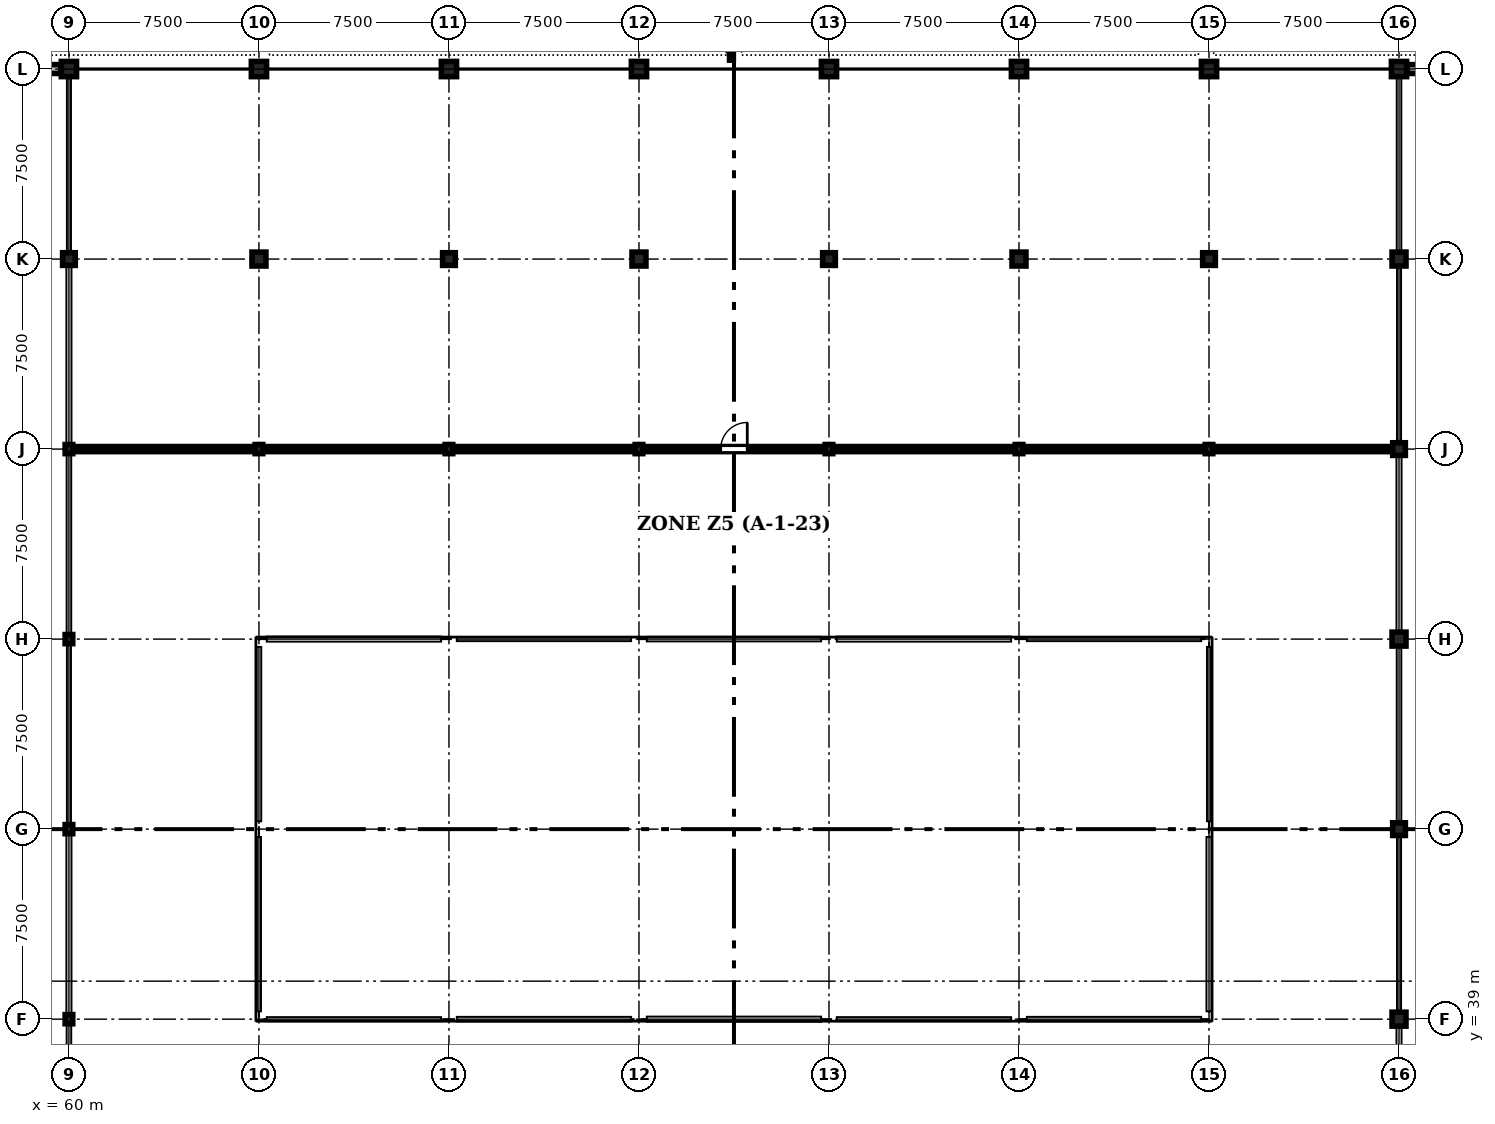
"""IFC4 building model, lengths in metres.
Left out: names, types, materials, properties, quantities, classifications, styles, units other than length and angle.
Written with IfcOpenShell. Run it as: python <this file> out.ifc"""

import sys

from ifc_helpers import new_model, si_unit, direction, frame, frame_2d, origin, origin_2d, place, context, subcontext, project, spatial, rectangle, circle, i_section, extrude, element, fill, save


model = new_model("IFC4")
c1 = context("Model", 3, precision=1e-05, world=origin(), true_north=direction((0.0, 1.0)))
c2 = subcontext(c1, "Body", "Model", "MODEL_VIEW")
j1 = project(units=[si_unit("LENGTHUNIT", "METRE"), si_unit("PLANEANGLEUNIT", "RADIAN")], contexts=[c1])
p1 = place(None, origin())
s1 = spatial("IfcSite", under=j1, at=p1, CompositionType="ELEMENT")
p2 = place(p1, origin())
s2 = spatial("IfcBuilding", under=s1, at=p2, CompositionType="ELEMENT")
p3 = place(p2, frame((0.0, 0.0, 4.8)))
s3 = spatial("IfcBuildingStorey", under=s2, at=p3, CompositionType="ELEMENT", Elevation=4.8)
for number, where, z_axis, x_axis in (
    (1, (60.0, 39.0, 0.0), (0.0, 0.0, 1.0), (1.0, 0.0, 0.0)),
    (2, (60.0, 46.5, 0.0), (0.0, 0.0, 1.0), (1.0, 0.0, 0.0)),
    (3, (60.0, 54.0, 0.0), (0.0, 0.0, 1.0), (1.0, 0.0, 0.0)),
    (4, (60.0, 61.5, 0.0), (0.0, 0.0, 1.0), (1.0, 0.0, 0.0)),
):
    element("IfcColumn", number, at=place(p3, frame(where, z_axis=z_axis, x_axis=x_axis)), inside=s3, PredefinedType="COLUMN", context=c2, shape_type="SweptSolid", body=[
        extrude(i_section(OverallWidth=0.3, OverallDepth=0.36, WebThickness=0.012, FlangeThickness=0.022, FilletRadius=0.027, at=origin_2d()), origin(), (0.0, 0.0, 1.0), 4.5),
    ])
p4 = place(p3, frame((60.0, 69.0, 0.0), z_axis=(0.0, 0.0, 1.0), x_axis=(1.0, 0.0, 0.0)))
e5 = element("IfcColumn", 5, at=p4, inside=s3, PredefinedType="COLUMN", context=c2, shape_type="SweptSolid", body=[
    extrude(rectangle(XDim=0.5, YDim=0.5, at=origin_2d()), origin(), (0.0, 0.0, 1.0), 4.5),
])
p5 = place(p3, frame((60.0, 76.5, 0.0), z_axis=(0.0, 0.0, 1.0), x_axis=(1.0, 0.0, 0.0)))
e6 = element("IfcColumn", 6, at=p5, inside=s3, PredefinedType="COLUMN", context=c2, shape_type="SweptSolid", body=[
    extrude(circle(Radius=0.3, at=origin_2d()), origin(), (0.0, 0.0, 1.0), 4.5),
])
p6 = place(p3, frame((67.5, 61.5, 0.0), z_axis=(0.0, 0.0, 1.0), x_axis=(1.0, 0.0, 0.0)))
e7 = element("IfcColumn", 7, at=p6, inside=s3, PredefinedType="COLUMN", context=c2, shape_type="SweptSolid", body=[
    extrude(i_section(OverallWidth=0.3, OverallDepth=0.36, WebThickness=0.012, FlangeThickness=0.022, FilletRadius=0.027, at=origin_2d()), origin(), (0.0, 0.0, 1.0), 4.5),
])
p7 = place(p3, frame((67.5, 69.0, 0.0), z_axis=(0.0, 0.0, 1.0), x_axis=(1.0, 0.0, 0.0)))
e8 = element("IfcColumn", 8, at=p7, inside=s3, PredefinedType="COLUMN", context=c2, shape_type="SweptSolid", body=[
    extrude(rectangle(XDim=0.55, YDim=0.55, at=origin_2d()), origin(), (0.0, 0.0, 1.0), 4.5),
])
p8 = place(p3, frame((67.5, 76.5, 0.0), z_axis=(0.0, 0.0, 1.0), x_axis=(1.0, 0.0, 0.0)))
e9 = element("IfcColumn", 9, at=p8, inside=s3, PredefinedType="COLUMN", context=c2, shape_type="SweptSolid", body=[
    extrude(rectangle(XDim=0.6, YDim=0.6, at=origin_2d()), origin(), (0.0, 0.0, 1.0), 4.5),
])
p9 = place(p3, frame((75.0, 61.5, 0.0), z_axis=(0.0, 0.0, 1.0), x_axis=(1.0, 0.0, 0.0)))
e10 = element("IfcColumn", 10, at=p9, inside=s3, PredefinedType="COLUMN", context=c2, shape_type="SweptSolid", body=[
    extrude(i_section(OverallWidth=0.3, OverallDepth=0.36, WebThickness=0.012, FlangeThickness=0.022, FilletRadius=0.027, at=origin_2d()), origin(), (0.0, 0.0, 1.0), 4.5),
])
p10 = place(p3, frame((75.0, 69.0, 0.0), z_axis=(0.0, 0.0, 1.0), x_axis=(1.0, 0.0, 0.0)))
e11 = element("IfcColumn", 11, at=p10, inside=s3, PredefinedType="COLUMN", context=c2, shape_type="SweptSolid", body=[
    extrude(rectangle(XDim=0.5, YDim=0.5, at=origin_2d()), origin(), (0.0, 0.0, 1.0), 4.5),
])
p11 = place(p3, frame((75.0, 76.5, 0.0), z_axis=(0.0, 0.0, 1.0), x_axis=(1.0, 0.0, 0.0)))
e12 = element("IfcColumn", 12, at=p11, inside=s3, PredefinedType="COLUMN", context=c2, shape_type="SweptSolid", body=[
    extrude(rectangle(XDim=0.6, YDim=0.6, at=origin_2d()), origin(), (0.0, 0.0, 1.0), 4.5),
])
p12 = place(p3, frame((82.5, 61.5, 0.0), z_axis=(0.0, 0.0, 1.0), x_axis=(1.0, 0.0, 0.0)))
e13 = element("IfcColumn", 13, at=p12, inside=s3, PredefinedType="COLUMN", context=c2, shape_type="SweptSolid", body=[
    extrude(i_section(OverallWidth=0.3, OverallDepth=0.36, WebThickness=0.012, FlangeThickness=0.022, FilletRadius=0.027, at=origin_2d()), origin(), (0.0, 0.0, 1.0), 4.5),
])
p13 = place(p3, frame((82.5, 69.0, 0.0), z_axis=(0.0, 0.0, 1.0), x_axis=(1.0, 0.0, 0.0)))
e14 = element("IfcColumn", 14, at=p13, inside=s3, PredefinedType="COLUMN", context=c2, shape_type="SweptSolid", body=[
    extrude(rectangle(XDim=0.55, YDim=0.55, at=origin_2d()), origin(), (0.0, 0.0, 1.0), 4.5),
])
p14 = place(p3, frame((82.5, 76.5, 0.0), z_axis=(0.0, 0.0, 1.0), x_axis=(1.0, 0.0, 0.0)))
e15 = element("IfcColumn", 15, at=p14, inside=s3, PredefinedType="COLUMN", context=c2, shape_type="SweptSolid", body=[
    extrude(circle(Radius=0.3, at=origin_2d()), origin(), (0.0, 0.0, 1.0), 4.5),
])
p15 = place(p3, frame((90.0, 61.5, 0.0), z_axis=(0.0, 0.0, 1.0), x_axis=(1.0, 0.0, 0.0)))
e16 = element("IfcColumn", 16, at=p15, inside=s3, PredefinedType="COLUMN", context=c2, shape_type="SweptSolid", body=[
    extrude(i_section(OverallWidth=0.3, OverallDepth=0.36, WebThickness=0.012, FlangeThickness=0.022, FilletRadius=0.027, at=origin_2d()), origin(), (0.0, 0.0, 1.0), 4.5),
])
p16 = place(p3, frame((90.0, 69.0, 0.0), z_axis=(0.0, 0.0, 1.0), x_axis=(1.0, 0.0, 0.0)))
e17 = element("IfcColumn", 17, at=p16, inside=s3, PredefinedType="COLUMN", context=c2, shape_type="SweptSolid", body=[
    extrude(rectangle(XDim=0.5, YDim=0.5, at=origin_2d()), origin(), (0.0, 0.0, 1.0), 4.5),
])
p17 = place(p3, frame((90.0, 76.5, 0.0), z_axis=(0.0, 0.0, 1.0), x_axis=(1.0, 0.0, 0.0)))
e18 = element("IfcColumn", 18, at=p17, inside=s3, PredefinedType="COLUMN", context=c2, shape_type="SweptSolid", body=[
    extrude(rectangle(XDim=0.6, YDim=0.6, at=origin_2d()), origin(), (0.0, 0.0, 1.0), 4.5),
])
p18 = place(p3, frame((97.5, 61.5, 0.0), z_axis=(0.0, 0.0, 1.0), x_axis=(1.0, 0.0, 0.0)))
e19 = element("IfcColumn", 19, at=p18, inside=s3, PredefinedType="COLUMN", context=c2, shape_type="SweptSolid", body=[
    extrude(i_section(OverallWidth=0.3, OverallDepth=0.36, WebThickness=0.012, FlangeThickness=0.022, FilletRadius=0.027, at=origin_2d()), origin(), (0.0, 0.0, 1.0), 4.5),
])
p19 = place(p3, frame((97.5, 69.0, 0.0), z_axis=(0.0, 0.0, 1.0), x_axis=(1.0, 0.0, 0.0)))
e20 = element("IfcColumn", 20, at=p19, inside=s3, PredefinedType="COLUMN", context=c2, shape_type="SweptSolid", body=[
    extrude(rectangle(XDim=0.55, YDim=0.55, at=origin_2d()), origin(), (0.0, 0.0, 1.0), 4.5),
])
p20 = place(p3, frame((97.5, 76.5, 0.0), z_axis=(0.0, 0.0, 1.0), x_axis=(1.0, 0.0, 0.0)))
e21 = element("IfcColumn", 21, at=p20, inside=s3, PredefinedType="COLUMN", context=c2, shape_type="SweptSolid", body=[
    extrude(rectangle(XDim=0.6, YDim=0.6, at=origin_2d()), origin(), (0.0, 0.0, 1.0), 4.5),
])
p21 = place(p3, frame((105.0, 61.5, 0.0), z_axis=(0.0, 0.0, 1.0), x_axis=(1.0, 0.0, 0.0)))
e22 = element("IfcColumn", 22, at=p21, inside=s3, PredefinedType="COLUMN", context=c2, shape_type="SweptSolid", body=[
    extrude(i_section(OverallWidth=0.3, OverallDepth=0.36, WebThickness=0.012, FlangeThickness=0.022, FilletRadius=0.027, at=origin_2d()), origin(), (0.0, 0.0, 1.0), 4.5),
])
p22 = place(p3, frame((105.0, 69.0, 0.0), z_axis=(0.0, 0.0, 1.0), x_axis=(1.0, 0.0, 0.0)))
e23 = element("IfcColumn", 23, at=p22, inside=s3, PredefinedType="COLUMN", context=c2, shape_type="SweptSolid", body=[
    extrude(rectangle(XDim=0.5, YDim=0.5, at=origin_2d()), origin(), (0.0, 0.0, 1.0), 4.5),
])
p23 = place(p3, frame((105.0, 76.5, 0.0), z_axis=(0.0, 0.0, 1.0), x_axis=(1.0, 0.0, 0.0)))
e24 = element("IfcColumn", 24, at=p23, inside=s3, PredefinedType="COLUMN", context=c2, shape_type="SweptSolid", body=[
    extrude(circle(Radius=0.3, at=origin_2d()), origin(), (0.0, 0.0, 1.0), 4.5),
])
p24 = place(p3, frame((112.5, 39.0, 0.0), z_axis=(0.0, 0.0, 1.0), x_axis=(1.0, 0.0, 0.0)))
e25 = element("IfcColumn", 25, at=p24, inside=s3, PredefinedType="COLUMN", context=c2, shape_type="SweptSolid", body=[
    extrude(rectangle(XDim=0.55, YDim=0.55, at=origin_2d()), origin(), (0.0, 0.0, 1.0), 4.5),
])
p25 = place(p3, frame((112.5, 46.5, 0.0), z_axis=(0.0, 0.0, 1.0), x_axis=(1.0, 0.0, 0.0)))
e26 = element("IfcColumn", 26, at=p25, inside=s3, PredefinedType="COLUMN", context=c2, shape_type="SweptSolid", body=[
    extrude(rectangle(XDim=0.5, YDim=0.5, at=origin_2d()), origin(), (0.0, 0.0, 1.0), 4.5),
])
p26 = place(p3, frame((112.5, 54.0, 0.0), z_axis=(0.0, 0.0, 1.0), x_axis=(1.0, 0.0, 0.0)))
e27 = element("IfcColumn", 27, at=p26, inside=s3, PredefinedType="COLUMN", context=c2, shape_type="SweptSolid", body=[
    extrude(rectangle(XDim=0.55, YDim=0.55, at=origin_2d()), origin(), (0.0, 0.0, 1.0), 4.5),
])
p27 = place(p3, frame((112.5, 61.5, 0.0), z_axis=(0.0, 0.0, 1.0), x_axis=(1.0, 0.0, 0.0)))
e28 = element("IfcColumn", 28, at=p27, inside=s3, PredefinedType="COLUMN", context=c2, shape_type="SweptSolid", body=[
    extrude(rectangle(XDim=0.5, YDim=0.5, at=origin_2d()), origin(), (0.0, 0.0, 1.0), 4.5),
])
p28 = place(p3, frame((112.5, 69.0, 0.0), z_axis=(0.0, 0.0, 1.0), x_axis=(1.0, 0.0, 0.0)))
e29 = element("IfcColumn", 29, at=p28, inside=s3, PredefinedType="COLUMN", context=c2, shape_type="SweptSolid", body=[
    extrude(rectangle(XDim=0.55, YDim=0.55, at=origin_2d()), origin(), (0.0, 0.0, 1.0), 4.5),
])
p29 = place(p3, frame((112.5, 76.5, 0.0), z_axis=(0.0, 0.0, 1.0), x_axis=(1.0, 0.0, 0.0)))
e30 = element("IfcColumn", 30, at=p29, inside=s3, PredefinedType="COLUMN", context=c2, shape_type="SweptSolid", body=[
    extrude(rectangle(XDim=0.6, YDim=0.6, at=origin_2d()), origin(), (0.0, 0.0, 1.0), 4.5),
])
p30 = place(p3, frame((59.69, 76.5, 0.0), z_axis=(0.0, 0.0, 1.0), x_axis=(-1.0, 0.0, 0.0)))
e31 = element("IfcWall", 31, at=p30, inside=s3, PredefinedType="STANDARD", context=c2, shape_type="SweptSolid", body=[
    extrude(rectangle(XDim=6.88, YDim=0.35, at=frame_2d((3.44, 0.0))), origin(), (0.0, 0.0, 1.0), 3.63),
])
p31 = place(p30, frame((2.54, 0.0, 0.9)))
e32 = element("IfcOpeningElement", 32, at=p31, cuts=e31, PredefinedType="OPENING", context=c2, shape_type="SweptSolid", body=[
    extrude(rectangle(XDim=1.8, YDim=2.1, at=frame_2d((0.9, 1.05))), frame((0.0, 0.185, 0.0), z_axis=(0.0, -1.0, 0.0), x_axis=(1.0, 0.0, 0.0)), (0.0, 0.0, 1.0), 0.37),
])
p32 = place(p3, frame((119.69, 76.5, 0.0), z_axis=(0.0, 0.0, 1.0), x_axis=(-1.0, 0.0, 0.0)))
e33 = element("IfcWall", 33, at=p32, inside=s3, PredefinedType="STANDARD", context=c2, shape_type="SweptSolid", body=[
    extrude(rectangle(XDim=6.88, YDim=0.35, at=frame_2d((3.44, 0.0))), origin(), (0.0, 0.0, 1.0), 3.63),
])
p33 = place(p32, frame((2.34, 0.0, 0.9)))
e34 = element("IfcOpeningElement", 34, at=p33, cuts=e33, PredefinedType="OPENING", context=c2, shape_type="SweptSolid", body=[
    extrude(rectangle(XDim=2.2, YDim=1.95, at=frame_2d((1.1, 0.975))), frame((0.0, 0.185, 0.0), z_axis=(0.0, -1.0, 0.0), x_axis=(1.0, 0.0, 0.0)), (0.0, 0.0, 1.0), 0.37),
])
p34 = place(p3, frame((60.35, 61.5, 0.0), z_axis=(0.0, 0.0, 1.0), x_axis=(1.0, 0.0, 0.0)))
e35 = element("IfcWall", 35, at=p34, inside=s3, PredefinedType="STANDARD", context=c2, shape_type="SweptSolid", body=[
    extrude(rectangle(XDim=51.8, YDim=0.2, at=frame_2d((25.9, 0.0))), origin(), (0.0, 0.0, 1.0), 3.515),
])
p35 = place(p34, frame((25.375, 0.0, 0.0)))
e36 = element("IfcOpeningElement", 36, at=p35, cuts=e35, PredefinedType="OPENING", context=c2, shape_type="SweptSolid", body=[
    extrude(rectangle(XDim=1.05, YDim=2.2, at=frame_2d((0.525, 1.1))), frame((0.0, 0.11, 0.0), z_axis=(0.0, -1.0, 0.0), x_axis=(1.0, 0.0, 0.0)), (0.0, 0.0, 1.0), 0.22),
])
p36 = place(p3, frame((86.15, 76.85, 0.0), z_axis=(0.0, 0.0, 1.0), x_axis=(0.0, 1.0, 0.0)))
e37 = element("IfcWall", 37, at=p36, inside=s3, PredefinedType="PARTITIONING", context=c2, shape_type="SweptSolid", body=[
    extrude(rectangle(XDim=28.7, YDim=0.15, at=frame_2d((14.35, 0.0))), origin(), (0.0, 0.0, 1.0), 3.765),
])
p37 = place(p35, origin())
e38 = element("IfcDoor", 38, at=p37, inside=s3, OperationType="SINGLE_SWING_RIGHT", PredefinedType="DOOR", context=c2, shape_type="SweptSolid", body=[
    extrude(rectangle(XDim=1.05, YDim=2.2, at=frame_2d((0.525, 1.1))), frame((0.0, 0.025, 0.0), z_axis=(0.0, -1.0, 0.0), x_axis=(1.0, 0.0, 0.0)), (0.0, 0.0, 1.0), 0.05),
])
fill(e36, e38)
save(model, sys.argv[1])
